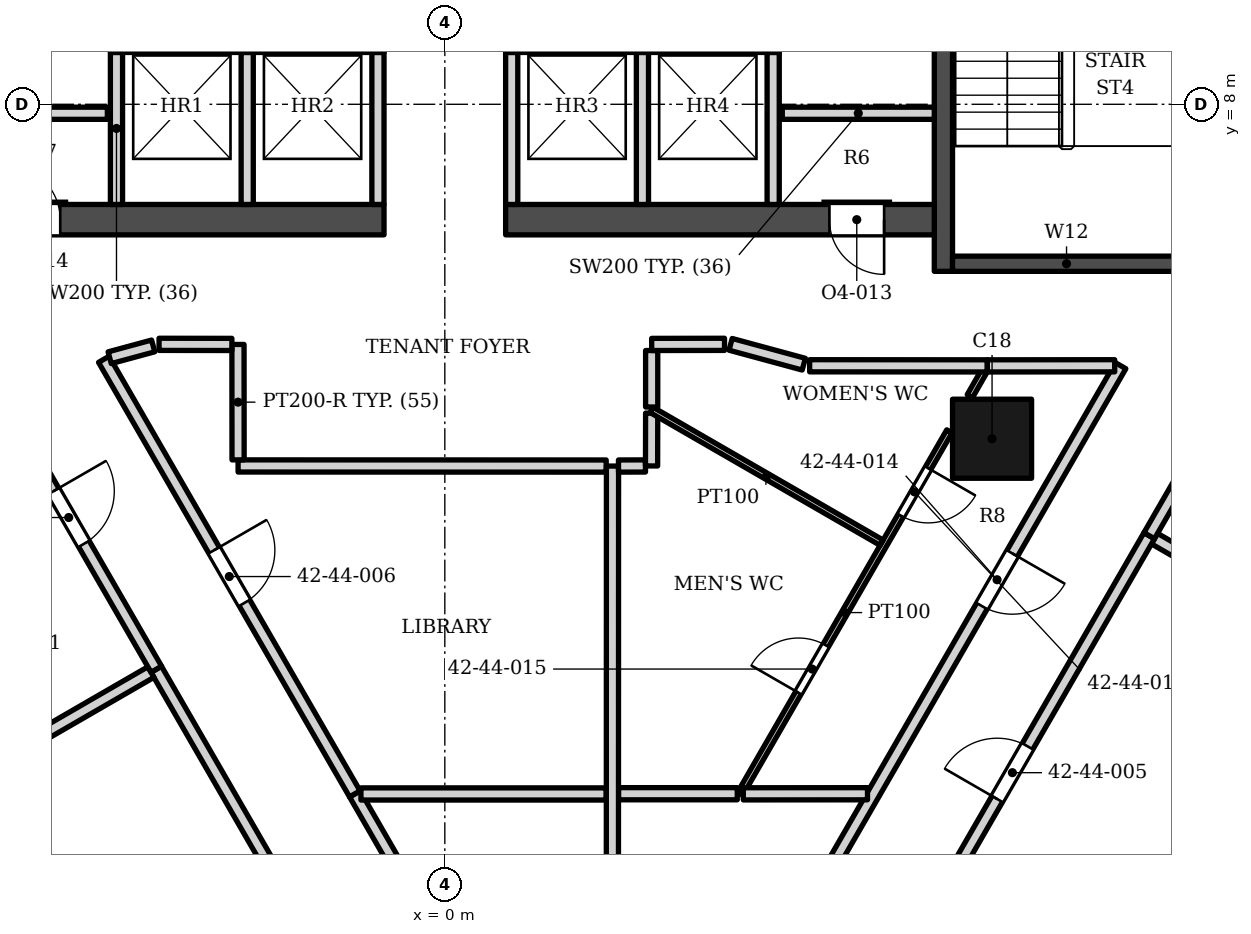
"""IFC4 building model, lengths in metres.
Left out: names, types, materials, properties, quantities, classifications, styles, units other than length and angle.
Written with IfcOpenShell. Run it as: python <this file> out.ifc"""

import sys

from ifc_helpers import new_model, si_unit, direction, frame, frame_2d, origin, origin_2d, place, context, subcontext, project, spatial, rectangle, extrude, element, fill, save


model = new_model("IFC4")
c1 = context("Model", 3, precision=1e-05, world=origin(), true_north=direction((0.0, 1.0)))
c2 = subcontext(c1, "Body", "Model", "MODEL_VIEW")
j1 = project(units=[si_unit("LENGTHUNIT", "METRE"), si_unit("PLANEANGLEUNIT", "RADIAN")], contexts=[c1])
p1 = place(None, origin())
s1 = spatial("IfcSite", under=j1, at=p1, CompositionType="ELEMENT")
p2 = place(p1, origin())
s2 = spatial("IfcBuilding", under=s1, at=p2, CompositionType="ELEMENT")
p3 = place(p2, frame((0.0, 0.0, 179.7)))
s3 = spatial("IfcBuildingStorey", under=s2, at=p3, CompositionType="ELEMENT", Elevation=179.7)
p4 = place(p3, frame((8.2, 5.253, 0.0), z_axis=(0.0, 0.0, 1.0), x_axis=(0.0, 1.0, 0.0)))
e1 = element("IfcWall", 1, at=p4, inside=s3, PredefinedType="SHEAR", context=c2, shape_type="SweptSolid", body=[
    extrude(rectangle(XDim=13.3, YDim=0.3, at=frame_2d((6.65, 0.0))), origin(), (0.0, 0.0, 1.0), 3.9),
])
p5 = place(p4, frame((7.1, 0.0, 0.0)))
e2 = element("IfcOpeningElement", 2, at=p5, cuts=e1, PredefinedType="OPENING", context=c2, shape_type="SweptSolid", body=[
    extrude(rectangle(XDim=1.4, YDim=2.1, at=frame_2d((0.7, 1.05))), frame((0.0, 0.16, 0.0), z_axis=(0.0, -1.0, 0.0), x_axis=(1.0, 0.0, 0.0)), (0.0, 0.0, 1.0), 0.32),
])
p6 = place(p4, frame((5.05, 0.0, 0.0)))
e3 = element("IfcOpeningElement", 3, at=p6, cuts=e1, PredefinedType="OPENING", context=c2, shape_type="SweptSolid", body=[
    extrude(rectangle(XDim=1.4, YDim=2.1, at=frame_2d((0.7, 1.05))), frame((0.0, 0.16, 0.0), z_axis=(0.0, -1.0, 0.0), x_axis=(1.0, 0.0, 0.0)), (0.0, 0.0, 1.0), 0.32),
])
p7 = place(p3, frame((8.35, 5.378, 0.0), z_axis=(0.0, 0.0, 1.0), x_axis=(1.0, 0.0, 0.0)))
e4 = element("IfcWall", 4, at=p7, inside=s3, PredefinedType="SHEAR", context=c2, shape_type="SweptSolid", body=[
    extrude(rectangle(XDim=3.75, YDim=0.25, at=frame_2d((1.875, 0.0))), origin(), (0.0, 0.0, 1.0), 3.9),
])
p8 = place(p3, frame((-8.05, 6.103, 0.0), z_axis=(0.0, 0.0, 1.0), x_axis=(1.0, 0.0, 0.0)))
e5 = element("IfcWall", 5, at=p8, inside=s3, PredefinedType="SHEAR", context=c2, shape_type="SweptSolid", body=[
    extrude(rectangle(XDim=7.05, YDim=0.5, at=frame_2d((3.525, 0.0))), origin(), (0.0, 0.0, 1.0), 3.9),
])
p9 = place(p8, frame((0.825, 0.0, 0.0)))
e6 = element("IfcOpeningElement", 6, at=p9, cuts=e5, PredefinedType="OPENING", context=c2, shape_type="SweptSolid", body=[
    extrude(rectangle(XDim=0.9, YDim=2.1, at=frame_2d((0.45, 1.05))), frame((0.0, 0.26, 0.0), z_axis=(0.0, -1.0, 0.0), x_axis=(1.0, 0.0, 0.0)), (0.0, 0.0, 1.0), 0.52),
])
p10 = place(p3, frame((1.0, 6.103, 0.0), z_axis=(0.0, 0.0, 1.0), x_axis=(1.0, 0.0, 0.0)))
e7 = element("IfcWall", 7, at=p10, inside=s3, PredefinedType="SHEAR", context=c2, shape_type="SweptSolid", body=[
    extrude(rectangle(XDim=7.05, YDim=0.5, at=frame_2d((3.525, 0.0))), origin(), (0.0, 0.0, 1.0), 3.9),
])
p11 = place(p10, frame((5.325, 0.0, 0.0)))
e8 = element("IfcOpeningElement", 8, at=p11, cuts=e7, PredefinedType="OPENING", context=c2, shape_type="SweptSolid", body=[
    extrude(rectangle(XDim=0.9, YDim=2.1, at=frame_2d((0.45, 1.05))), frame((0.0, 0.26, 0.0), z_axis=(0.0, -1.0, 0.0), x_axis=(1.0, 0.0, 0.0)), (0.0, 0.0, 1.0), 0.52),
])
p12 = place(p3, frame((9.0, 2.5, 0.0), z_axis=(0.0, 0.0, 1.0), x_axis=(1.0, 0.0, 0.0)))
e9 = element("IfcColumn", 9, at=p12, inside=s3, PredefinedType="COLUMN", context=c2, shape_type="SweptSolid", body=[
    extrude(rectangle(XDim=1.3, YDim=1.3, at=origin_2d()), origin(), (0.0, 0.0, 1.0), 3.9),
])
for number, where, z_axis, x_axis in (
    (10, (-5.4, 6.353, 0.0), (0.0, 0.0, 1.0), (0.0, 1.0, 0.0)),
    (11, (-3.25, 6.353, 0.0), (0.0, 0.0, 1.0), (0.0, 1.0, 0.0)),
    (12, (-1.1, 6.353, 0.0), (0.0, 0.0, 1.0), (0.0, 1.0, 0.0)),
    (13, (1.1, 6.353, 0.0), (0.0, 0.0, 1.0), (0.0, 1.0, 0.0)),
    (14, (3.25, 6.353, 0.0), (0.0, 0.0, 1.0), (0.0, 1.0, 0.0)),
    (15, (5.4, 6.353, 0.0), (0.0, 0.0, 1.0), (0.0, 1.0, 0.0)),
    (16, (-8.05, 7.853, 0.0), (0.0, 0.0, 1.0), (1.0, 0.0, 0.0)),
    (17, (5.55, 7.853, 0.0), (0.0, 0.0, 1.0), (1.0, 0.0, 0.0)),
):
    element("IfcWall", number, at=place(p3, frame(where, z_axis=z_axis, x_axis=x_axis)), inside=s3, PredefinedType="SOLIDWALL", context=c2, shape_type="SweptSolid", body=[
        extrude(rectangle(XDim=2.5, YDim=0.2, at=frame_2d((1.25, 0.0))), origin(), (0.0, 0.0, 1.0), 3.73),
    ])
p13 = place(p3, frame((2.785, -10.732, 0.0), z_axis=(0.0, 0.0, 1.0), x_axis=(0.499820110187, 0.866129238309, 0.0)))
e18 = element("IfcWall", 18, at=p13, inside=s3, PredefinedType="PARTITIONING", context=c2, shape_type="SweptSolid", body=[
    extrude(rectangle(XDim=16.664, YDim=0.2, at=frame_2d((8.332, 0.0))), origin(), (0.0, 0.0, 1.0), 2.742),
])
p14 = place(p13, frame((3.818, 0.0, 0.0)))
e19 = element("IfcOpeningElement", 19, at=p14, cuts=e18, PredefinedType="OPENING", context=c2, shape_type="SweptSolid", body=[
    extrude(rectangle(XDim=0.9, YDim=2.1, at=frame_2d((0.45, 1.05))), frame((0.0, 0.11, 0.0), z_axis=(0.0, -1.0, 0.0), x_axis=(1.0, 0.0, 0.0)), (0.0, 0.0, 1.0), 0.22),
])
p15 = place(p13, frame((12.1, 0.0, 0.0)))
e20 = element("IfcOpeningElement", 20, at=p15, cuts=e18, PredefinedType="OPENING", context=c2, shape_type="SweptSolid", body=[
    extrude(rectangle(XDim=1.0, YDim=2.1, at=frame_2d((0.5, 1.05))), frame((0.0, 0.11, 0.0), z_axis=(0.0, -1.0, 0.0), x_axis=(1.0, 0.0, 0.0)), (0.0, 0.0, 1.0), 0.22),
])
p16 = place(p3, frame((-4.746, -1.292, 0.0), z_axis=(0.0, 0.0, 1.0), x_axis=(0.5000018851, -0.866024315419, 0.0)))
e21 = element("IfcWall", 21, at=p16, inside=s3, PredefinedType="PARTITIONING", context=c2, shape_type="SweptSolid", body=[
    extrude(rectangle(XDim=9.0, YDim=0.2, at=frame_2d((4.5, 0.0))), origin(), (0.0, 0.0, 1.0), 2.742),
])
p17 = place(p16, frame((4.0, 0.0, 0.0)))
e22 = element("IfcOpeningElement", 22, at=p17, cuts=e21, PredefinedType="OPENING", context=c2, shape_type="SweptSolid", body=[
    extrude(rectangle(XDim=1.0, YDim=2.1, at=frame_2d((0.5, 1.05))), frame((0.0, 0.11, 0.0), z_axis=(0.0, -1.0, 0.0), x_axis=(1.0, 0.0, 0.0)), (0.0, 0.0, 1.0), 0.22),
])
p18 = place(p16, frame((7.502, 0.0, 0.0)))
e23 = element("IfcOpeningElement", 23, at=p18, cuts=e21, PredefinedType="OPENING", context=c2, shape_type="SweptSolid", body=[
    extrude(rectangle(XDim=1.0, YDim=2.1, at=frame_2d((0.5, 1.05))), frame((0.0, 0.11, 0.0), z_axis=(0.0, -1.0, 0.0), x_axis=(1.0, 0.0, 0.0)), (0.0, 0.0, 1.0), 0.22),
])
p19 = place(p3, frame((-11.63, -5.265, 0.0), z_axis=(0.0, 0.0, 1.0), x_axis=(0.865784523432, 0.500416985109, 0.0)))
e24 = element("IfcWall", 24, at=p19, inside=s3, PredefinedType="PARTITIONING", context=c2, shape_type="SweptSolid", body=[
    extrude(rectangle(XDim=7.849, YDim=0.2, at=frame_2d((3.925, 0.0))), origin(), (0.0, 0.0, 1.0), 2.742),
])
p20 = place(p3, frame((-1.48, -3.342, 0.0), z_axis=(0.0, 0.0, 1.0), x_axis=(0.499828066166, -0.866124647076, 0.0)))
e25 = element("IfcWall", 25, at=p20, inside=s3, PredefinedType="PARTITIONING", context=c2, shape_type="SweptSolid", body=[
    extrude(rectangle(XDim=8.271, YDim=0.2, at=frame_2d((4.136, 0.0))), origin(), (0.0, 0.0, 1.0), 2.742),
])
p21 = place(p20, frame((3.784, 0.0, 0.0)))
e26 = element("IfcOpeningElement", 26, at=p21, cuts=e25, PredefinedType="OPENING", context=c2, shape_type="SweptSolid", body=[
    extrude(rectangle(XDim=0.9, YDim=2.1, at=frame_2d((0.45, 1.05))), frame((0.0, 0.11, 0.0), z_axis=(0.0, -1.0, 0.0), x_axis=(1.0, 0.0, 0.0)), (0.0, 0.0, 1.0), 0.22),
])
p22 = place(p3, frame((-1.38, -3.342, 0.0), z_axis=(0.0, 0.0, 1.0), x_axis=(1.0, 0.0, 0.0)))
e27 = element("IfcWall", 27, at=p22, inside=s3, PredefinedType="PARTITIONING", context=c2, shape_type="SweptSolid", body=[
    extrude(rectangle(XDim=4.034, YDim=0.2, at=frame_2d((2.017, 0.0))), origin(), (0.0, 0.0, 1.0), 2.742),
])
p23 = place(p3, frame((2.856, -3.338, 0.0), z_axis=(0.0, 0.0, 1.0), x_axis=(1.0, 0.0, 0.0)))
e28 = element("IfcWall", 28, at=p23, inside=s3, PredefinedType="PARTITIONING", context=c2, shape_type="SweptSolid", body=[
    extrude(rectangle(XDim=1.954, YDim=0.2, at=frame_2d((0.977, 0.0))), origin(), (0.0, 0.0, 1.0), 2.742),
])
p24 = place(p3, frame((4.857, -3.34, 0.0), z_axis=(0.0, 0.0, 1.0), x_axis=(0.499969101261, 0.866043242445, 0.0)))
e29 = element("IfcWall", 29, at=p24, inside=s3, PredefinedType="PARTITIONING", context=c2, shape_type="SweptSolid", body=[
    extrude(rectangle(XDim=6.883, YDim=0.1, at=frame_2d((3.442, 0.0))), origin(), (0.0, 0.0, 1.0), 2.742),
])
p25 = place(p24, frame((1.919, 0.0, 0.0)))
e30 = element("IfcOpeningElement", 30, at=p25, cuts=e29, PredefinedType="OPENING", context=c2, shape_type="SweptSolid", body=[
    extrude(rectangle(XDim=0.9, YDim=2.1, at=frame_2d((0.45, 1.05))), frame((0.0, 0.06, 0.0), z_axis=(0.0, -1.0, 0.0), x_axis=(1.0, 0.0, 0.0)), (0.0, 0.0, 1.0), 0.12),
])
p26 = place(p24, frame((5.284, 0.0, 0.0)))
e31 = element("IfcOpeningElement", 31, at=p26, cuts=e29, PredefinedType="OPENING", context=c2, shape_type="SweptSolid", body=[
    extrude(rectangle(XDim=0.9, YDim=2.1, at=frame_2d((0.45, 1.05))), frame((0.0, 0.06, 0.0), z_axis=(0.0, -1.0, 0.0), x_axis=(1.0, 0.0, 0.0)), (0.0, 0.0, 1.0), 0.12),
])
p27 = place(p3, frame((4.909, -3.34, 0.0), z_axis=(0.0, 0.0, 1.0), x_axis=(0.99999974282, 0.000717188436, 0.0)))
e32 = element("IfcWall", 32, at=p27, inside=s3, PredefinedType="PARTITIONING", context=c2, shape_type="SweptSolid", body=[
    extrude(rectangle(XDim=2.042, YDim=0.2, at=frame_2d((1.021, 0.0))), origin(), (0.0, 0.0, 1.0), 3.73),
])
p28 = place(p3, frame((-7.626, 3.699, 0.0), z_axis=(0.0, 0.0, 1.0), x_axis=(0.499998744741, -0.866026128507, 0.0)))
e33 = element("IfcWall", 33, at=p28, inside=s3, PredefinedType="PARTITIONING", context=c2, shape_type="SweptSolid", body=[
    extrude(rectangle(XDim=5.762, YDim=0.2, at=frame_2d((2.881, 0.0))), origin(), (0.0, 0.0, 1.0), 2.742),
])
p29 = place(p28, frame((2.381, 0.0, 0.0)))
e34 = element("IfcOpeningElement", 34, at=p29, cuts=e33, PredefinedType="OPENING", context=c2, shape_type="SweptSolid", body=[
    extrude(rectangle(XDim=1.0, YDim=2.1, at=frame_2d((0.5, 1.05))), frame((0.0, 0.11, 0.0), z_axis=(0.0, -1.0, 0.0), x_axis=(1.0, 0.0, 0.0)), (0.0, 0.0, 1.0), 0.22),
])
p30 = place(p3, frame((11.671, 0.858, 0.0), z_axis=(0.0, 0.0, 1.0), x_axis=(0.865862960607, -0.500281254345, 0.0)))
e35 = element("IfcWall", 35, at=p30, inside=s3, PredefinedType="PARTITIONING", context=c2, shape_type="SweptSolid", body=[
    extrude(rectangle(XDim=4.45, YDim=0.2, at=frame_2d((2.225, 0.0))), origin(), (0.0, 0.0, 1.0), 2.884),
])
p31 = place(p3, frame((7.085, -6.889, 0.0), z_axis=(0.0, 0.0, 1.0), x_axis=(0.499981539608, 0.866036061634, 0.0)))
e36 = element("IfcWall", 36, at=p31, inside=s3, PredefinedType="PARTITIONING", context=c2, shape_type="SweptSolid", body=[
    extrude(rectangle(XDim=9.0, YDim=0.2, at=frame_2d((4.5, 0.0))), origin(), (0.0, 0.0, 1.0), 2.742),
])
p32 = place(p31, frame((4.0, 0.0, 0.0)))
e37 = element("IfcOpeningElement", 37, at=p32, cuts=e36, PredefinedType="OPENING", context=c2, shape_type="SweptSolid", body=[
    extrude(rectangle(XDim=1.0, YDim=2.1, at=frame_2d((0.5, 1.05))), frame((0.0, 0.11, 0.0), z_axis=(0.0, -1.0, 0.0), x_axis=(1.0, 0.0, 0.0)), (0.0, 0.0, 1.0), 0.22),
])
p33 = place(p3, frame((-3.4, 2.052, 0.0), z_axis=(0.0, 0.0, 1.0), x_axis=(0.999999947967, -0.000322593636, 0.0)))
e38 = element("IfcWall", 38, at=p33, inside=s3, PredefinedType="PARTITIONING", context=c2, shape_type="SweptSolid", body=[
    extrude(rectangle(XDim=6.054, YDim=0.2, at=frame_2d((3.027, 0.0))), origin(), (0.0, 0.0, 1.0), 3.73),
])
p34 = place(p3, frame((2.754, -10.584, 0.0), z_axis=(0.0, 0.0, 1.0), x_axis=(0.00025119316, 0.999999968451, 0.0)))
e39 = element("IfcWall", 39, at=p34, inside=s3, PredefinedType="PARTITIONING", context=c2, shape_type="SweptSolid", body=[
    extrude(rectangle(XDim=12.635, YDim=0.2, at=frame_2d((6.317, 0.0))), origin(), (0.0, 0.0, 1.0), 3.73),
])
p35 = place(p3, frame((2.856, 2.051, 0.0), z_axis=(0.0, 0.0, 1.0), x_axis=(0.999996218015, 0.002750264626, 0.0)))
e40 = element("IfcWall", 40, at=p35, inside=s3, PredefinedType="PARTITIONING", context=c2, shape_type="SweptSolid", body=[
    extrude(rectangle(XDim=0.444, YDim=0.2, at=frame_2d((0.222, 0.0))), origin(), (0.0, 0.0, 1.0), 3.73),
])
p36 = place(p3, frame((-3.402, 4.051, 0.0), z_axis=(0.0, 0.0, 1.0), x_axis=(0.001028938362, -0.999999470643, 0.0)))
e41 = element("IfcWall", 41, at=p36, inside=s3, PredefinedType="PARTITIONING", context=c2, shape_type="SweptSolid", body=[
    extrude(rectangle(XDim=1.898, YDim=0.2, at=frame_2d((0.949, 0.0))), origin(), (0.0, 0.0, 1.0), 3.73),
])
p37 = place(p3, frame((3.4, 2.052, 0.0), z_axis=(0.0, 0.0, 1.0), x_axis=(0.002247816743, 0.999997473657, 0.0)))
e42 = element("IfcWall", 42, at=p37, inside=s3, PredefinedType="PARTITIONING", context=c2, shape_type="SweptSolid", body=[
    extrude(rectangle(XDim=0.869, YDim=0.2, at=frame_2d((0.435, 0.0))), origin(), (0.0, 0.0, 1.0), 3.73),
])
p38 = place(p3, frame((3.4, 2.975, 0.0), z_axis=(0.0, 0.0, 1.0), x_axis=(0.866040401994, -0.49997402144, 0.0)))
e43 = element("IfcWall", 43, at=p38, inside=s3, PredefinedType="PARTITIONING", context=c2, shape_type="SweptSolid", body=[
    extrude(rectangle(XDim=4.368, YDim=0.1, at=frame_2d((2.184, 0.0))), origin(), (0.0, 0.0, 1.0), 2.742),
])
p39 = place(p3, frame((8.635, 3.2, 0.0), z_axis=(0.0, 0.0, 1.0), x_axis=(0.496967188395, 0.867769332057, 0.0)))
e44 = element("IfcWall", 44, at=p39, inside=s3, PredefinedType="PARTITIONING", context=c2, shape_type="SweptSolid", body=[
    extrude(rectangle(XDim=0.476, YDim=0.1, at=frame_2d((0.238, 0.0))), origin(), (0.0, 0.0, 1.0), 3.73),
])
p40 = place(p3, frame((6.0, 3.7, 0.0), z_axis=(0.0, 0.0, 1.0), x_axis=(0.99999982895, -0.000584892948, 0.0)))
e45 = element("IfcWall", 45, at=p40, inside=s3, PredefinedType="PARTITIONING", context=c2, shape_type="SweptSolid", body=[
    extrude(rectangle(XDim=2.922, YDim=0.2, at=frame_2d((1.461, 0.0))), origin(), (0.0, 0.0, 1.0), 3.73),
])
p41 = place(p3, frame((8.922, 3.698, 0.0), z_axis=(0.0, 0.0, 1.0), x_axis=(0.999999667194, 0.000815850544, 0.0)))
e46 = element("IfcWall", 46, at=p41, inside=s3, PredefinedType="PARTITIONING", context=c2, shape_type="SweptSolid", body=[
    extrude(rectangle(XDim=2.095, YDim=0.2, at=frame_2d((1.047, 0.0))), origin(), (0.0, 0.0, 1.0), 3.73),
])
p42 = place(p3, frame((11.585, 0.906, 0.0), z_axis=(0.0, 0.0, 1.0), x_axis=(0.499591387573, 0.866261187785, 0.0)))
e47 = element("IfcWall", 47, at=p42, inside=s3, PredefinedType="PARTITIONING", context=c2, shape_type="SweptSolid", body=[
    extrude(rectangle(XDim=3.225, YDim=0.2, at=frame_2d((1.613, 0.0))), origin(), (0.0, 0.0, 1.0), 3.73),
])
p43 = place(p3, frame((4.7, 4.052, 0.0), z_axis=(0.0, 0.0, 1.0), x_axis=(0.965137813174, -0.26174224264, 0.0)))
e48 = element("IfcWall", 48, at=p43, inside=s3, PredefinedType="PARTITIONING", context=c2, shape_type="SweptSolid", body=[
    extrude(rectangle(XDim=1.247, YDim=0.2, at=frame_2d((0.624, 0.0))), origin(), (0.0, 0.0, 1.0), 2.742),
])
p44 = place(p3, frame((-5.608, 3.806, 0.0), z_axis=(0.0, 0.0, 1.0), x_axis=(0.500189366784, -0.865916045212, 0.0)))
e49 = element("IfcWall", 49, at=p44, inside=s3, PredefinedType="PARTITIONING", context=c2, shape_type="SweptSolid", body=[
    extrude(rectangle(XDim=8.252, YDim=0.2, at=frame_2d((4.126, 0.0))), origin(), (0.0, 0.0, 1.0), 2.742),
])
p45 = place(p44, frame((3.625, 0.0, 0.0)))
e50 = element("IfcOpeningElement", 50, at=p45, cuts=e49, PredefinedType="OPENING", context=c2, shape_type="SweptSolid", body=[
    extrude(rectangle(XDim=1.0, YDim=2.4, at=frame_2d((0.5, 1.2))), frame((0.0, 0.11, 0.0), z_axis=(0.0, -1.0, 0.0), x_axis=(1.0, 0.0, 0.0)), (0.0, 0.0, 1.0), 0.22),
])
p46 = place(p3, frame((3.402, 3.022, 0.0), z_axis=(0.0, 0.0, 1.0), x_axis=(0.0, 1.0, 0.0)))
e51 = element("IfcWall", 51, at=p46, inside=s3, PredefinedType="PARTITIONING", context=c2, shape_type="SweptSolid", body=[
    extrude(rectangle(XDim=0.929, YDim=0.2, at=frame_2d((0.464, 0.0))), origin(), (0.0, 0.0, 1.0), 3.73),
])
p47 = place(p3, frame((-5.512, 3.832, 0.0), z_axis=(0.0, 0.0, 1.0), x_axis=(0.965127638193, 0.261779758568, 0.0)))
e52 = element("IfcWall", 52, at=p47, inside=s3, PredefinedType="PARTITIONING", context=c2, shape_type="SweptSolid", body=[
    extrude(rectangle(XDim=0.741, YDim=0.2, at=frame_2d((0.371, 0.0))), origin(), (0.0, 0.0, 1.0), 3.73),
])
for number, where, z_axis, x_axis in (
    (53, (-4.7, 4.052, 0.0), (0.0, 0.0, 1.0), (1.0, -0.001, 0.0)),
    (54, (3.402, 4.051, 0.0), (0.0, 0.0, 1.0), (1.0, 0.001, 0.0)),
):
    element("IfcWall", number, at=place(p3, frame(where, z_axis=z_axis, x_axis=x_axis)), inside=s3, PredefinedType="PARTITIONING", context=c2, shape_type="SweptSolid", body=[
        extrude(rectangle(XDim=1.198, YDim=0.2, at=frame_2d((0.599, 0.0))), origin(), (0.0, 0.0, 1.0), 3.73),
    ])
p48 = place(p9, origin())
e55 = element("IfcDoor", 55, at=p48, inside=s3, OperationType="SINGLE_SWING_LEFT", PredefinedType="DOOR", context=c2, shape_type="SweptSolid", body=[
    extrude(rectangle(XDim=0.9, YDim=2.1, at=frame_2d((0.45, 1.05))), frame((0.0, 0.025, 0.0), z_axis=(0.0, -1.0, 0.0), x_axis=(1.0, 0.0, 0.0)), (0.0, 0.0, 1.0), 0.05),
])
fill(e6, e55)
p49 = place(p11, origin())
e56 = element("IfcDoor", 56, at=p49, inside=s3, OperationType="SINGLE_SWING_RIGHT", PredefinedType="DOOR", context=c2, shape_type="SweptSolid", body=[
    extrude(rectangle(XDim=0.9, YDim=2.1, at=frame_2d((0.45, 1.05))), frame((0.0, 0.025, 0.0), z_axis=(0.0, -1.0, 0.0), x_axis=(1.0, 0.0, 0.0)), (0.0, 0.0, 1.0), 0.05),
])
fill(e8, e56)
p50 = place(p32, origin())
e57 = element("IfcDoor", 57, at=p50, inside=s3, OperationType="SINGLE_SWING_LEFT", PredefinedType="DOOR", context=c2, shape_type="SweptSolid", body=[
    extrude(rectangle(XDim=1.0, YDim=2.1, at=frame_2d((0.5, 1.05))), frame((0.0, 0.025, 0.0), z_axis=(0.0, -1.0, 0.0), x_axis=(1.0, 0.0, 0.0)), (0.0, 0.0, 1.0), 0.05),
])
fill(e37, e57)
p51 = place(p45, origin())
e58 = element("IfcDoor", 58, at=p51, inside=s3, OperationType="SINGLE_SWING_LEFT", PredefinedType="DOOR", context=c2, shape_type="SweptSolid", body=[
    extrude(rectangle(XDim=1.0, YDim=2.4, at=frame_2d((0.5, 1.2))), frame((0.0, 0.025, 0.0), z_axis=(0.0, -1.0, 0.0), x_axis=(1.0, 0.0, 0.0)), (0.0, 0.0, 1.0), 0.05),
])
fill(e50, e58)
p52 = place(p29, origin())
e59 = element("IfcDoor", 59, at=p52, inside=s3, OperationType="SINGLE_SWING_LEFT", PredefinedType="DOOR", context=c2, shape_type="SweptSolid", body=[
    extrude(rectangle(XDim=1.0, YDim=2.1, at=frame_2d((0.5, 1.05))), frame((0.0, 0.025, 0.0), z_axis=(0.0, -1.0, 0.0), x_axis=(1.0, 0.0, 0.0)), (0.0, 0.0, 1.0), 0.05),
])
fill(e34, e59)
p53 = place(p15, origin())
e60 = element("IfcDoor", 60, at=p53, inside=s3, OperationType="SINGLE_SWING_RIGHT", PredefinedType="DOOR", context=c2, shape_type="SweptSolid", body=[
    extrude(rectangle(XDim=1.0, YDim=2.1, at=frame_2d((0.5, 1.05))), frame((0.0, 0.025, 0.0), z_axis=(0.0, -1.0, 0.0), x_axis=(1.0, 0.0, 0.0)), (0.0, 0.0, 1.0), 0.05),
])
fill(e20, e60)
p54 = place(p25, origin())
e61 = element("IfcDoor", 61, at=p54, inside=s3, OperationType="SINGLE_SWING_LEFT", PredefinedType="DOOR", context=c2, shape_type="SweptSolid", body=[
    extrude(rectangle(XDim=0.9, YDim=2.1, at=frame_2d((0.45, 1.05))), frame((0.0, 0.025, 0.0), z_axis=(0.0, -1.0, 0.0), x_axis=(1.0, 0.0, 0.0)), (0.0, 0.0, 1.0), 0.05),
])
fill(e30, e61)
p55 = place(p26, origin())
e62 = element("IfcDoor", 62, at=p55, inside=s3, OperationType="SINGLE_SWING_RIGHT", PredefinedType="DOOR", context=c2, shape_type="SweptSolid", body=[
    extrude(rectangle(XDim=0.9, YDim=2.1, at=frame_2d((0.45, 1.05))), frame((0.0, 0.025, 0.0), z_axis=(0.0, -1.0, 0.0), x_axis=(1.0, 0.0, 0.0)), (0.0, 0.0, 1.0), 0.05),
])
fill(e31, e62)
save(model, sys.argv[1])
